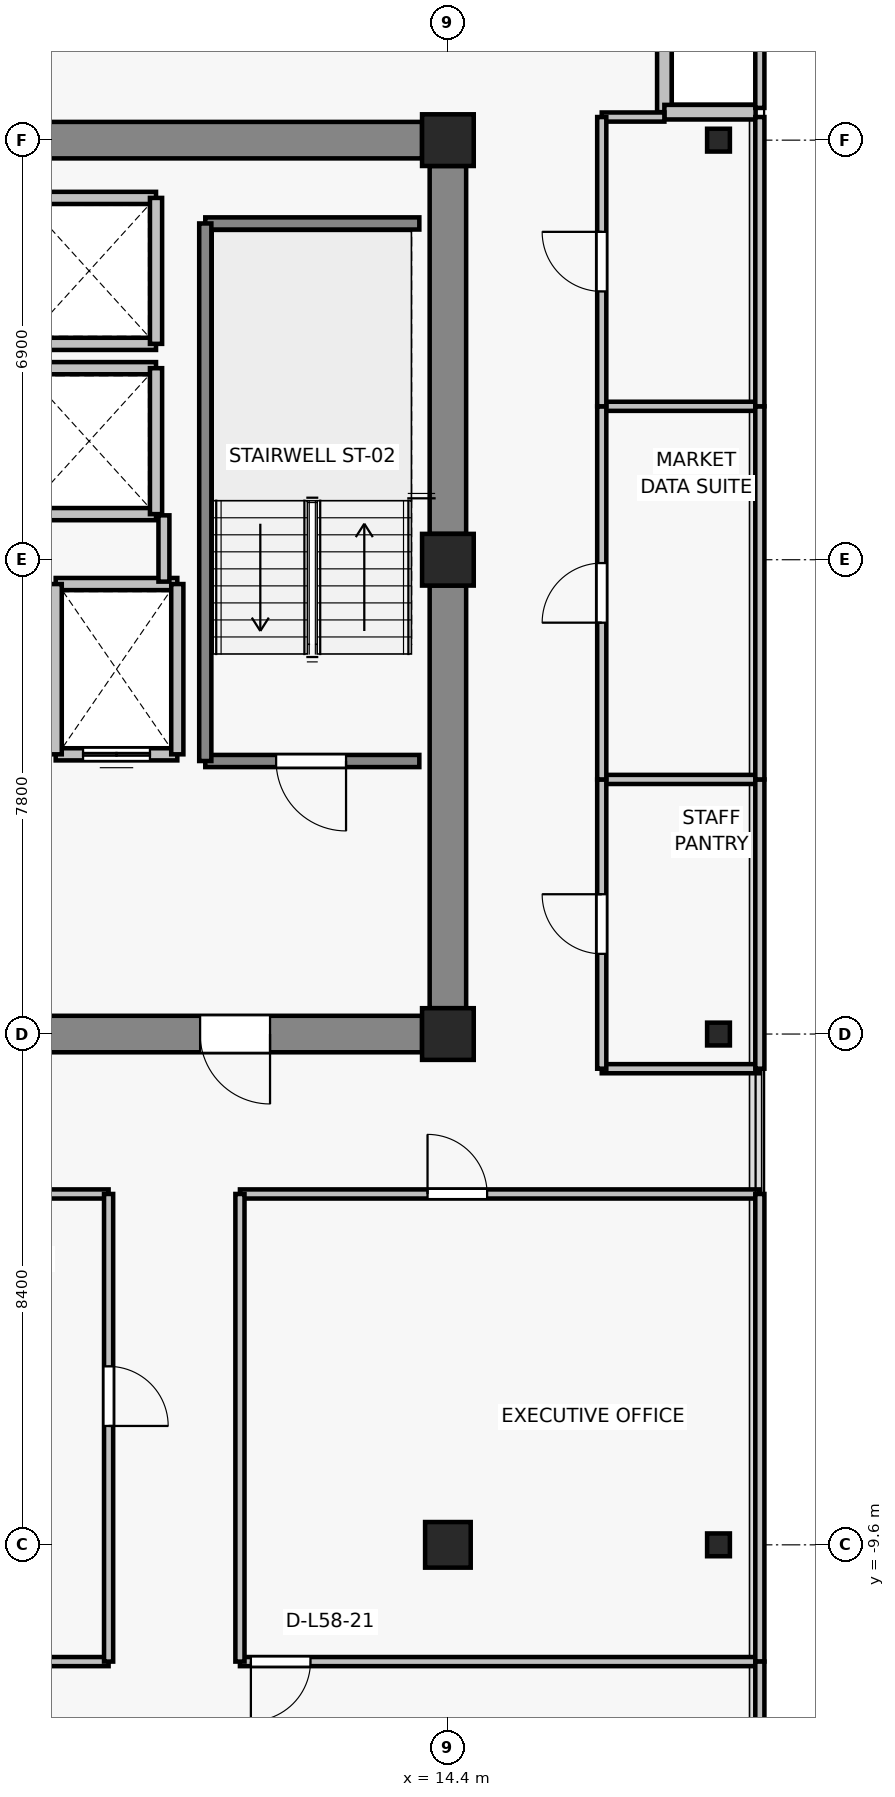
"""IFC4 building model, lengths in metres.
Left out: names, types, materials, properties, quantities, classifications, styles, units other than length and angle.
Written with IfcOpenShell. Run it as: python <this file> out.ifc"""

import sys

from ifc_helpers import new_model, si_unit, direction, frame, frame_2d, origin, origin_2d, place, context, subcontext, project, spatial, rectangle, i_section, extrude, source, transform, mapped, element, fill, save


model = new_model("IFC4")
c1 = context("Model", 3, precision=1e-05, world=origin(), true_north=direction((0.0, 1.0)))
c2 = subcontext(c1, "Body", "Model", "MODEL_VIEW")
j1 = project(units=[si_unit("LENGTHUNIT", "METRE"), si_unit("PLANEANGLEUNIT", "RADIAN")], contexts=[c1])
p1 = place(None, origin())
s1 = spatial("IfcSite", under=j1, at=p1, CompositionType="ELEMENT")
p2 = place(p1, origin())
s2 = spatial("IfcBuilding", under=s1, at=p2, CompositionType="ELEMENT")
p3 = place(p2, frame((0.0, 0.0, 208.9)))
s3 = spatial("IfcBuildingStorey", under=s2, at=p3, CompositionType="ELEMENT", Elevation=208.9)
for number, where, z_axis, x_axis in (
    (1, (14.4, -1.2, 0.0), (0.0, 0.0, 1.0), (1.0, 0.0, 0.0)),
    (2, (14.4, 6.6, 0.0), (0.0, 0.0, 1.0), (1.0, 0.0, 0.0)),
    (3, (14.4, 13.5, 0.0), (0.0, 0.0, 1.0), (1.0, 0.0, 0.0)),
):
    element("IfcColumn", number, at=place(p3, frame(where, z_axis=z_axis, x_axis=x_axis)), inside=s3, PredefinedType="COLUMN", context=c2, shape_type="SweptSolid", body=[
        extrude(rectangle(XDim=0.85, YDim=0.85, at=origin_2d()), origin(), (0.0, 0.0, 1.0), 3.3),
    ])
p4 = place(p3, frame((14.4, -9.6, 0.0), z_axis=(0.0, 0.0, 1.0), x_axis=(1.0, 0.0, 0.0)))
e4 = element("IfcColumn", 4, at=p4, inside=s3, PredefinedType="COLUMN", context=c2, shape_type="SweptSolid", body=[
    extrude(rectangle(XDim=0.75, YDim=0.75, at=origin_2d()), origin(), (0.0, 0.0, 1.0), 3.3),
])
for number, where, z_axis, x_axis in (
    (5, (18.85, -9.6, 0.0), (0.0, 0.0, 1.0), (1.0, 0.0, 0.0)),
    (6, (18.85, -1.2, 0.0), (0.0, 0.0, 1.0), (1.0, 0.0, 0.0)),
    (7, (18.85, 13.5, 0.0), (0.0, 0.0, 1.0), (1.0, 0.0, 0.0)),
):
    element("IfcColumn", number, at=place(p3, frame(where, z_axis=z_axis, x_axis=x_axis)), inside=s3, PredefinedType="COLUMN", context=c2, shape_type="SweptSolid", body=[
        extrude(i_section(OverallWidth=0.375, OverallDepth=0.375, WebThickness=0.017, FlangeThickness=0.027, FilletRadius=0.015, at=origin_2d()), origin(), (0.0, 0.0, 1.0), 3.3),
    ])
p5 = place(p3, frame((7.625, 13.5, 0.0), z_axis=(0.0, 0.0, 1.0), x_axis=(1.0, 0.0, 0.0)))
e8 = element("IfcWall", 8, at=p5, inside=s3, PredefinedType="SHEAR", context=c2, shape_type="SweptSolid", body=[
    extrude(rectangle(XDim=6.35, YDim=0.6, at=frame_2d((3.175, 0.0))), origin(), (0.0, 0.0, 1.0), 3.075),
])
p6 = place(p3, frame((14.4, -0.775, 0.0), z_axis=(0.0, 0.0, 1.0), x_axis=(0.0, 1.0, 0.0)))
e9 = element("IfcWall", 9, at=p6, inside=s3, PredefinedType="SHEAR", context=c2, shape_type="SweptSolid", body=[
    extrude(rectangle(XDim=6.95, YDim=0.6, at=frame_2d((3.475, 0.0))), origin(), (0.0, 0.0, 1.0), 3.075),
])
p7 = place(p3, frame((14.4, 7.025, 0.0), z_axis=(0.0, 0.0, 1.0), x_axis=(0.0, 1.0, 0.0)))
e10 = element("IfcWall", 10, at=p7, inside=s3, PredefinedType="SHEAR", context=c2, shape_type="SweptSolid", body=[
    extrude(rectangle(XDim=6.05, YDim=0.6, at=frame_2d((3.025, 0.0))), origin(), (0.0, 0.0, 1.0), 3.075),
])
p8 = place(p3, frame((13.975, -1.2, 0.0), z_axis=(0.0, 0.0, 1.0), x_axis=(-1.0, 0.0, 0.0)))
e11 = element("IfcWall", 11, at=p8, inside=s3, PredefinedType="SHEAR", context=c2, shape_type="SweptSolid", body=[
    extrude(rectangle(XDim=6.35, YDim=0.6, at=frame_2d((3.175, 0.0))), origin(), (0.0, 0.0, 1.0), 3.075),
])
p9 = place(p8, frame((2.5, 0.0, 0.0)))
e12 = element("IfcOpeningElement", 12, at=p9, cuts=e11, PredefinedType="OPENING", context=c2, shape_type="SweptSolid", body=[
    extrude(rectangle(XDim=1.15, YDim=2.15, at=frame_2d((0.575, 1.075))), frame((0.0, 0.31, 0.0), z_axis=(0.0, -1.0, 0.0), x_axis=(1.0, 0.0, 0.0)), (0.0, 0.0, 1.0), 0.62),
])
for number, where, z_axis, x_axis in (
    (13, (17.96, 13.96, 0.0), (0.0, 0.0, 1.0), (0.0, 1.0, 0.0)),
    (14, (19.46, 13.96, 0.0), (0.0, 0.0, 1.0), (-1.0, 0.0, 0.0)),
):
    element("IfcWall", number, at=place(p3, frame(where, z_axis=z_axis, x_axis=x_axis)), inside=s3, PredefinedType="SOLIDWALL", context=c2, shape_type="SweptSolid", body=[
        extrude(rectangle(XDim=1.5, YDim=0.24, at=frame_2d((0.75, 0.0))), origin(), (0.0, 0.0, 1.0), 3.075),
    ])
p10 = place(p3, frame((9.95, 3.4, 0.0), z_axis=(0.0, 0.0, 1.0), x_axis=(-1.0, 0.0, 0.0)))
e15 = element("IfcWall", 15, at=p10, inside=s3, PredefinedType="SOLIDWALL", context=c2, shape_type="SweptSolid", body=[
    extrude(rectangle(XDim=2.0, YDim=0.2, at=frame_2d((1.0, 0.0))), origin(), (0.0, 0.0, 1.0), 3.075),
])
p11 = place(p10, frame((0.45, 0.0, 0.0)))
e16 = element("IfcOpeningElement", 16, at=p11, cuts=e15, PredefinedType="OPENING", context=c2, shape_type="SweptSolid", body=[
    extrude(rectangle(XDim=1.1, YDim=2.2, at=frame_2d((0.55, 1.1))), frame((0.0, 0.11, 0.0), z_axis=(0.0, -1.0, 0.0), x_axis=(1.0, 0.0, 0.0)), (0.0, 0.0, 1.0), 0.22),
])
p12 = place(p3, frame((7.95, 6.2, 0.0), z_axis=(0.0, 0.0, 1.0), x_axis=(1.0, 0.0, 0.0)))
e17 = element("IfcWall", 17, at=p12, inside=s3, PredefinedType="SOLIDWALL", context=c2, shape_type="SweptSolid", body=[
    extrude(rectangle(XDim=2.0, YDim=0.2, at=frame_2d((1.0, 0.0))), origin(), (0.0, 0.0, 1.0), 3.075),
])
for number, where, z_axis, x_axis in (
    (18, (7.95, 3.4, 0.0), (0.0, 0.0, 1.0), (0.0, 1.0, 0.0)),
    (19, (9.95, 6.2, 0.0), (0.0, 0.0, 1.0), (0.0, -1.0, 0.0)),
):
    element("IfcWall", number, at=place(p3, frame(where, z_axis=z_axis, x_axis=x_axis)), inside=s3, PredefinedType="SOLIDWALL", context=c2, shape_type="SweptSolid", body=[
        extrude(rectangle(XDim=2.8, YDim=0.2, at=frame_2d((1.4, 0.0))), origin(), (0.0, 0.0, 1.0), 3.075),
    ])
for number, where, z_axis, x_axis in (
    (20, (9.6, 7.35, 0.0), (0.0, 0.0, 1.0), (-1.0, 0.0, 0.0)),
    (21, (7.4, 9.75, 0.0), (0.0, 0.0, 1.0), (1.0, 0.0, 0.0)),
):
    element("IfcWall", number, at=place(p3, frame(where, z_axis=z_axis, x_axis=x_axis)), inside=s3, PredefinedType="SOLIDWALL", context=c2, shape_type="SweptSolid", body=[
        extrude(rectangle(XDim=2.2, YDim=0.2, at=frame_2d((1.1, 0.0))), origin(), (0.0, 0.0, 1.0), 2.615),
    ])
p13 = place(p3, frame((9.6, 9.75, 0.0), z_axis=(0.0, 0.0, 1.0), x_axis=(0.0, -1.0, 0.0)))
e22 = element("IfcWall", 22, at=p13, inside=s3, PredefinedType="SOLIDWALL", context=c2, shape_type="SweptSolid", body=[
    extrude(rectangle(XDim=2.4, YDim=0.2, at=frame_2d((1.2, 0.0))), origin(), (0.0, 0.0, 1.0), 3.075),
])
for number, where, z_axis, x_axis in (
    (23, (9.6, 10.15, 0.0), (0.0, 0.0, 1.0), (-1.0, 0.0, 0.0)),
    (24, (7.4, 12.55, 0.0), (0.0, 0.0, 1.0), (1.0, 0.0, 0.0)),
):
    element("IfcWall", number, at=place(p3, frame(where, z_axis=z_axis, x_axis=x_axis)), inside=s3, PredefinedType="SOLIDWALL", context=c2, shape_type="SweptSolid", body=[
        extrude(rectangle(XDim=2.2, YDim=0.2, at=frame_2d((1.1, 0.0))), origin(), (0.0, 0.0, 1.0), 2.615),
    ])
p14 = place(p3, frame((9.6, 12.55, 0.0), z_axis=(0.0, 0.0, 1.0), x_axis=(0.0, -1.0, 0.0)))
e25 = element("IfcWall", 25, at=p14, inside=s3, PredefinedType="SOLIDWALL", context=c2, shape_type="SweptSolid", body=[
    extrude(rectangle(XDim=2.4, YDim=0.2, at=frame_2d((1.2, 0.0))), origin(), (0.0, 0.0, 1.0), 3.075),
])
p15 = place(p3, frame((13.93, 3.29, 0.0), z_axis=(0.0, 0.0, 1.0), x_axis=(-1.0, 0.0, 0.0)))
e26 = element("IfcWall", 26, at=p15, inside=s3, PredefinedType="SOLIDWALL", context=c2, shape_type="SweptSolid", body=[
    extrude(rectangle(XDim=3.52, YDim=0.2, at=frame_2d((1.76, 0.0))), origin(), (0.0, 0.0, 1.0), 3.075),
])
p16 = place(p15, frame((1.205, 0.0, 0.0)))
e27 = element("IfcOpeningElement", 27, at=p16, cuts=e26, PredefinedType="OPENING", context=c2, shape_type="SweptSolid", body=[
    extrude(rectangle(XDim=1.15, YDim=2.15, at=frame_2d((0.575, 1.075))), frame((0.0, 0.11, 0.0), z_axis=(0.0, -1.0, 0.0), x_axis=(1.0, 0.0, 0.0)), (0.0, 0.0, 1.0), 0.22),
])
p17 = place(p3, frame((10.41, 12.13, 0.0), z_axis=(0.0, 0.0, 1.0), x_axis=(1.0, 0.0, 0.0)))
e28 = element("IfcWall", 28, at=p17, inside=s3, PredefinedType="SOLIDWALL", context=c2, shape_type="SweptSolid", body=[
    extrude(rectangle(XDim=3.52, YDim=0.2, at=frame_2d((1.76, 0.0))), origin(), (0.0, 0.0, 1.0), 3.075),
])
p18 = place(p3, frame((10.41, 3.29, 0.0), z_axis=(0.0, 0.0, 1.0), x_axis=(0.0, 1.0, 0.0)))
e29 = element("IfcWall", 29, at=p18, inside=s3, PredefinedType="SOLIDWALL", context=c2, shape_type="SweptSolid", body=[
    extrude(rectangle(XDim=8.84, YDim=0.2, at=frame_2d((4.42, 0.0))), origin(), (0.0, 0.0, 1.0), 3.075),
])
p19 = place(p3, frame((9.73, 7.33, 0.0), z_axis=(0.0, 0.0, 1.0), x_axis=(0.0, -1.0, 0.0)))
e30 = element("IfcWall", 30, at=p19, inside=s3, PredefinedType="PARTITIONING", context=c2, shape_type="SweptSolid", body=[
    extrude(rectangle(XDim=1.09, YDim=0.18, at=frame_2d((0.545, 0.0))), origin(), (0.0, 0.0, 1.0), 3.075),
])
p20 = place(p3, frame((19.53, -11.52, 0.0), z_axis=(0.0, 0.0, 1.0), x_axis=(-1.0, 0.0, 0.0)))
e31 = element("IfcWall", 31, at=p20, inside=s3, PredefinedType="PARTITIONING", context=c2, shape_type="SweptSolid", body=[
    extrude(rectangle(XDim=8.55, YDim=0.15, at=frame_2d((4.275, 0.0))), origin(), (0.0, 0.0, 1.0), 2.615),
])
p21 = place(p20, frame((7.39, 0.0, 0.0)))
e32 = element("IfcOpeningElement", 32, at=p21, cuts=e31, PredefinedType="OPENING", context=c2, shape_type="SweptSolid", body=[
    extrude(rectangle(XDim=0.98, YDim=2.15, at=frame_2d((0.49, 1.075))), frame((0.0, 0.085, 0.0), z_axis=(0.0, -1.0, 0.0), x_axis=(1.0, 0.0, 0.0)), (0.0, 0.0, 1.0), 0.17),
])
p22 = place(p3, frame((10.98, -3.83, 0.0), z_axis=(0.0, 0.0, 1.0), x_axis=(1.0, 0.0, 0.0)))
e33 = element("IfcWall", 33, at=p22, inside=s3, PredefinedType="PARTITIONING", context=c2, shape_type="SweptSolid", body=[
    extrude(rectangle(XDim=8.55, YDim=0.15, at=frame_2d((4.275, 0.0))), origin(), (0.0, 0.0, 1.0), 2.615),
])
p23 = place(p22, frame((3.085, 0.0, 0.0)))
e34 = element("IfcOpeningElement", 34, at=p23, cuts=e33, PredefinedType="OPENING", context=c2, shape_type="SweptSolid", body=[
    extrude(rectangle(XDim=0.98, YDim=2.15, at=frame_2d((0.49, 1.075))), frame((0.0, 0.085, 0.0), z_axis=(0.0, -1.0, 0.0), x_axis=(1.0, 0.0, 0.0)), (0.0, 0.0, 1.0), 0.17),
])
p24 = place(p3, frame((10.98, -11.52, 0.0), z_axis=(0.0, 0.0, 1.0), x_axis=(0.0, 1.0, 0.0)))
e35 = element("IfcWall", 35, at=p24, inside=s3, PredefinedType="PARTITIONING", context=c2, shape_type="SweptSolid", body=[
    extrude(rectangle(XDim=7.69, YDim=0.15, at=frame_2d((3.845, 0.0))), origin(), (0.0, 0.0, 1.0), 2.615),
])
p25 = place(p3, frame((19.53, -3.83, 0.0), z_axis=(0.0, 0.0, 1.0), x_axis=(0.0, -1.0, 0.0)))
e36 = element("IfcWall", 36, at=p25, inside=s3, PredefinedType="PARTITIONING", context=c2, shape_type="SweptSolid", body=[
    extrude(rectangle(XDim=7.69, YDim=0.15, at=frame_2d((3.845, 0.0))), origin(), (0.0, 0.0, 1.0), 2.665),
])
p26 = place(p3, frame((19.53, -11.52, 0.0), z_axis=(0.0, 0.0, 1.0), x_axis=(0.0, -1.0, 0.0)))
e37 = element("IfcWall", 37, at=p26, inside=s3, PredefinedType="PARTITIONING", context=c2, shape_type="SweptSolid", body=[
    extrude(rectangle(XDim=5.51, YDim=0.15, at=frame_2d((2.755, 0.0))), origin(), (0.0, 0.0, 1.0), 3.075),
])
for number, where, z_axis, x_axis in (
    (38, (8.82, -11.52, 0.0), (0.0, 0.0, 1.0), (-1.0, 0.0, 0.0)),
    (39, (5.48, -3.83, 0.0), (0.0, 0.0, 1.0), (1.0, 0.0, 0.0)),
):
    element("IfcWall", number, at=place(p3, frame(where, z_axis=z_axis, x_axis=x_axis)), inside=s3, PredefinedType="PARTITIONING", context=c2, shape_type="SweptSolid", body=[
        extrude(rectangle(XDim=3.34, YDim=0.15, at=frame_2d((1.67, 0.0))), origin(), (0.0, 0.0, 1.0), 2.615),
    ])
p27 = place(p3, frame((8.82, -3.83, 0.0), z_axis=(0.0, 0.0, 1.0), x_axis=(0.0, -1.0, 0.0)))
e40 = element("IfcWall", 40, at=p27, inside=s3, PredefinedType="PARTITIONING", context=c2, shape_type="SweptSolid", body=[
    extrude(rectangle(XDim=7.69, YDim=0.15, at=frame_2d((3.845, 0.0))), origin(), (0.0, 0.0, 1.0), 2.615),
])
p28 = place(p27, frame((2.835, 0.0, 0.0)))
e41 = element("IfcOpeningElement", 41, at=p28, cuts=e40, PredefinedType="OPENING", context=c2, shape_type="SweptSolid", body=[
    extrude(rectangle(XDim=0.98, YDim=2.15, at=frame_2d((0.49, 1.075))), frame((0.0, 0.085, 0.0), z_axis=(0.0, -1.0, 0.0), x_axis=(1.0, 0.0, 0.0)), (0.0, 0.0, 1.0), 0.17),
])
for number, where, z_axis, x_axis in (
    (42, (19.53, -1.77, 0.0), (0.0, 0.0, 1.0), (-1.0, 0.0, 0.0)),
    (43, (16.93, 2.987, 0.0), (0.0, 0.0, 1.0), (1.0, 0.0, 0.0)),
):
    element("IfcWall", number, at=place(p3, frame(where, z_axis=z_axis, x_axis=x_axis)), inside=s3, PredefinedType="PARTITIONING", context=c2, shape_type="SweptSolid", body=[
        extrude(rectangle(XDim=2.6, YDim=0.15, at=frame_2d((1.3, 0.0))), origin(), (0.0, 0.0, 1.0), 2.765),
    ])
p29 = place(p3, frame((16.93, -1.77, 0.0), z_axis=(0.0, 0.0, 1.0), x_axis=(0.0, 1.0, 0.0)))
e44 = element("IfcWall", 44, at=p29, inside=s3, PredefinedType="PARTITIONING", context=c2, shape_type="SweptSolid", body=[
    extrude(rectangle(XDim=4.757, YDim=0.15, at=frame_2d((2.378, 0.0))), origin(), (0.0, 0.0, 1.0), 2.615),
])
p30 = place(p29, frame((1.889, 0.0, 0.0)))
e45 = element("IfcOpeningElement", 45, at=p30, cuts=e44, PredefinedType="OPENING", context=c2, shape_type="SweptSolid", body=[
    extrude(rectangle(XDim=0.98, YDim=2.15, at=frame_2d((0.49, 1.075))), frame((0.0, 0.085, 0.0), z_axis=(0.0, -1.0, 0.0), x_axis=(1.0, 0.0, 0.0)), (0.0, 0.0, 1.0), 0.17),
])
p31 = place(p3, frame((19.53, 2.987, 0.0), z_axis=(0.0, 0.0, 1.0), x_axis=(0.0, -1.0, 0.0)))
e46 = element("IfcWall", 46, at=p31, inside=s3, PredefinedType="PARTITIONING", context=c2, shape_type="SweptSolid", body=[
    extrude(rectangle(XDim=4.757, YDim=0.15, at=frame_2d((2.378, 0.0))), origin(), (0.0, 0.0, 1.0), 3.075),
])
p32 = place(p3, frame((16.93, 9.123, 0.0), z_axis=(0.0, 0.0, 1.0), x_axis=(1.0, 0.0, 0.0)))
e47 = element("IfcWall", 47, at=p32, inside=s3, PredefinedType="PARTITIONING", context=c2, shape_type="SweptSolid", body=[
    extrude(rectangle(XDim=2.6, YDim=0.15, at=frame_2d((1.3, 0.0))), origin(), (0.0, 0.0, 1.0), 2.765),
])
p33 = place(p3, frame((16.93, 2.987, 0.0), z_axis=(0.0, 0.0, 1.0), x_axis=(0.0, 1.0, 0.0)))
e48 = element("IfcWall", 48, at=p33, inside=s3, PredefinedType="PARTITIONING", context=c2, shape_type="SweptSolid", body=[
    extrude(rectangle(XDim=6.136, YDim=0.15, at=frame_2d((3.068, 0.0))), origin(), (0.0, 0.0, 1.0), 3.075),
])
p34 = place(p33, frame((2.578, 0.0, 0.0)))
e49 = element("IfcOpeningElement", 49, at=p34, cuts=e48, PredefinedType="OPENING", context=c2, shape_type="SweptSolid", body=[
    extrude(rectangle(XDim=0.98, YDim=2.15, at=frame_2d((0.49, 1.075))), frame((0.0, 0.085, 0.0), z_axis=(0.0, -1.0, 0.0), x_axis=(1.0, 0.0, 0.0)), (0.0, 0.0, 1.0), 0.17),
])
p35 = place(p3, frame((19.53, 9.123, 0.0), z_axis=(0.0, 0.0, 1.0), x_axis=(0.0, -1.0, 0.0)))
e50 = element("IfcWall", 50, at=p35, inside=s3, PredefinedType="PARTITIONING", context=c2, shape_type="SweptSolid", body=[
    extrude(rectangle(XDim=6.136, YDim=0.15, at=frame_2d((3.068, 0.0))), origin(), (0.0, 0.0, 1.0), 3.075),
])
p36 = place(p3, frame((16.93, 13.88, 0.0), z_axis=(0.0, 0.0, 1.0), x_axis=(1.0, 0.0, 0.0)))
e51 = element("IfcWall", 51, at=p36, inside=s3, PredefinedType="PARTITIONING", context=c2, shape_type="SweptSolid", body=[
    extrude(rectangle(XDim=1.03, YDim=0.15, at=frame_2d((0.515, 0.0))), origin(), (0.0, 0.0, 1.0), 3.075),
])
p37 = place(p3, frame((16.93, 9.123, 0.0), z_axis=(0.0, 0.0, 1.0), x_axis=(0.0, 1.0, 0.0)))
e52 = element("IfcWall", 52, at=p37, inside=s3, PredefinedType="PARTITIONING", context=c2, shape_type="SweptSolid", body=[
    extrude(rectangle(XDim=4.757, YDim=0.15, at=frame_2d((2.378, 0.0))), origin(), (0.0, 0.0, 1.0), 2.615),
])
p38 = place(p37, frame((1.889, 0.0, 0.0)))
e53 = element("IfcOpeningElement", 53, at=p38, cuts=e52, PredefinedType="OPENING", context=c2, shape_type="SweptSolid", body=[
    extrude(rectangle(XDim=0.98, YDim=2.15, at=frame_2d((0.49, 1.075))), frame((0.0, 0.085, 0.0), z_axis=(0.0, -1.0, 0.0), x_axis=(1.0, 0.0, 0.0)), (0.0, 0.0, 1.0), 0.17),
])
p39 = place(p3, frame((19.53, 13.88, 0.0), z_axis=(0.0, 0.0, 1.0), x_axis=(0.0, -1.0, 0.0)))
e54 = element("IfcWall", 54, at=p39, inside=s3, PredefinedType="PARTITIONING", context=c2, shape_type="SweptSolid", body=[
    extrude(rectangle(XDim=4.757, YDim=0.15, at=frame_2d((2.378, 0.0))), origin(), (0.0, 0.0, 1.0), 3.075),
])
p40 = place(p3, frame((19.53, 17.03, 0.0), z_axis=(0.0, 0.0, 1.0), x_axis=(0.0, -1.0, 0.0)))
e55 = element("IfcWall", 55, at=p40, inside=s3, PredefinedType="PARTITIONING", context=c2, shape_type="SweptSolid", body=[
    extrude(rectangle(XDim=3.0, YDim=0.15, at=frame_2d((1.5, 0.0))), origin(), (0.0, 0.0, 1.0), 3.075),
])
m1 = source(origin(), c2, "Body", "SweptSolid", [
    extrude(rectangle(XDim=1.1, YDim=2.2, at=frame_2d((0.55, 1.1))), frame((0.0, 0.025, 0.0), z_axis=(0.0, -1.0, 0.0), x_axis=(1.0, 0.0, 0.0)), (0.0, 0.0, 1.0), 0.05),
])
p41 = place(p11, origin())
e56 = element("IfcDoor", 56, at=p41, inside=s3, OperationType="DOUBLE_DOOR_SLIDING", PredefinedType="DOOR", context=c2, shape_type="MappedRepresentation", body=[
    mapped(m1, transform((0.0, 0.0, 0.0), x_axis=(1.0, 0.0, 0.0), y_axis=(0.0, 1.0, 0.0), z_axis=(0.0, 0.0, 1.0), scale=1.0)),
])
fill(e16, e56)
m2 = source(origin(), c2, "Body", "SweptSolid", [
    extrude(rectangle(XDim=1.15, YDim=2.15, at=frame_2d((0.575, 1.075))), frame((0.0, 0.025, 0.0), z_axis=(0.0, -1.0, 0.0), x_axis=(1.0, 0.0, 0.0)), (0.0, 0.0, 1.0), 0.05),
])
p42 = place(p16, origin())
e57 = element("IfcDoor", 57, at=p42, inside=s3, OperationType="SINGLE_SWING_LEFT", PredefinedType="DOOR", context=c2, shape_type="MappedRepresentation", body=[
    mapped(m2, transform((0.0, 0.0, 0.0), x_axis=(1.0, 0.0, 0.0), y_axis=(0.0, 1.0, 0.0), z_axis=(0.0, 0.0, 1.0), scale=1.0)),
])
fill(e27, e57)
p43 = place(p9, origin())
e58 = element("IfcDoor", 58, at=p43, inside=s3, OperationType="SINGLE_SWING_LEFT", PredefinedType="DOOR", context=c2, shape_type="MappedRepresentation", body=[
    mapped(m2, transform((0.0, 0.0, 0.0), x_axis=(1.0, 0.0, 0.0), y_axis=(0.0, 1.0, 0.0), z_axis=(0.0, 0.0, 1.0), scale=1.0)),
])
fill(e12, e58)
m3 = source(origin(), c2, "Body", "SweptSolid", [
    extrude(rectangle(XDim=0.98, YDim=2.15, at=frame_2d((0.49, 1.075))), frame((0.0, 0.025, 0.0), z_axis=(0.0, -1.0, 0.0), x_axis=(1.0, 0.0, 0.0)), (0.0, 0.0, 1.0), 0.05),
])
p44 = place(p23, origin())
e59 = element("IfcDoor", 59, at=p44, inside=s3, OperationType="SINGLE_SWING_LEFT", PredefinedType="DOOR", context=c2, shape_type="MappedRepresentation", body=[
    mapped(m3, transform((0.0, 0.0, 0.0), x_axis=(1.0, 0.0, 0.0), y_axis=(0.0, 1.0, 0.0), z_axis=(0.0, 0.0, 1.0), scale=1.0)),
])
fill(e34, e59)
p45 = place(p21, origin())
e60 = element("IfcDoor", 60, at=p45, inside=s3, OperationType="SINGLE_SWING_RIGHT", PredefinedType="DOOR", context=c2, shape_type="MappedRepresentation", body=[
    mapped(m3, transform((0.0, 0.0, 0.0), x_axis=(1.0, 0.0, 0.0), y_axis=(0.0, 1.0, 0.0), z_axis=(0.0, 0.0, 1.0), scale=1.0)),
])
fill(e32, e60)
p46 = place(p28, origin())
e61 = element("IfcDoor", 61, at=p46, inside=s3, OperationType="SINGLE_SWING_RIGHT", PredefinedType="DOOR", context=c2, shape_type="MappedRepresentation", body=[
    mapped(m3, transform((0.0, 0.0, 0.0), x_axis=(1.0, 0.0, 0.0), y_axis=(0.0, 1.0, 0.0), z_axis=(0.0, 0.0, 1.0), scale=1.0)),
])
fill(e41, e61)
p47 = place(p30, origin())
e62 = element("IfcDoor", 62, at=p47, inside=s3, OperationType="SINGLE_SWING_RIGHT", PredefinedType="DOOR", context=c2, shape_type="MappedRepresentation", body=[
    mapped(m3, transform((0.0, 0.0, 0.0), x_axis=(1.0, 0.0, 0.0), y_axis=(0.0, 1.0, 0.0), z_axis=(0.0, 0.0, 1.0), scale=1.0)),
])
fill(e45, e62)
p48 = place(p34, origin())
e63 = element("IfcDoor", 63, at=p48, inside=s3, OperationType="SINGLE_SWING_LEFT", PredefinedType="DOOR", context=c2, shape_type="MappedRepresentation", body=[
    mapped(m3, transform((0.0, 0.0, 0.0), x_axis=(1.0, 0.0, 0.0), y_axis=(0.0, 1.0, 0.0), z_axis=(0.0, 0.0, 1.0), scale=1.0)),
])
fill(e49, e63)
p49 = place(p38, origin())
e64 = element("IfcDoor", 64, at=p49, inside=s3, OperationType="SINGLE_SWING_RIGHT", PredefinedType="DOOR", context=c2, shape_type="MappedRepresentation", body=[
    mapped(m3, transform((0.0, 0.0, 0.0), x_axis=(1.0, 0.0, 0.0), y_axis=(0.0, 1.0, 0.0), z_axis=(0.0, 0.0, 1.0), scale=1.0)),
])
fill(e53, e64)
save(model, sys.argv[1])
